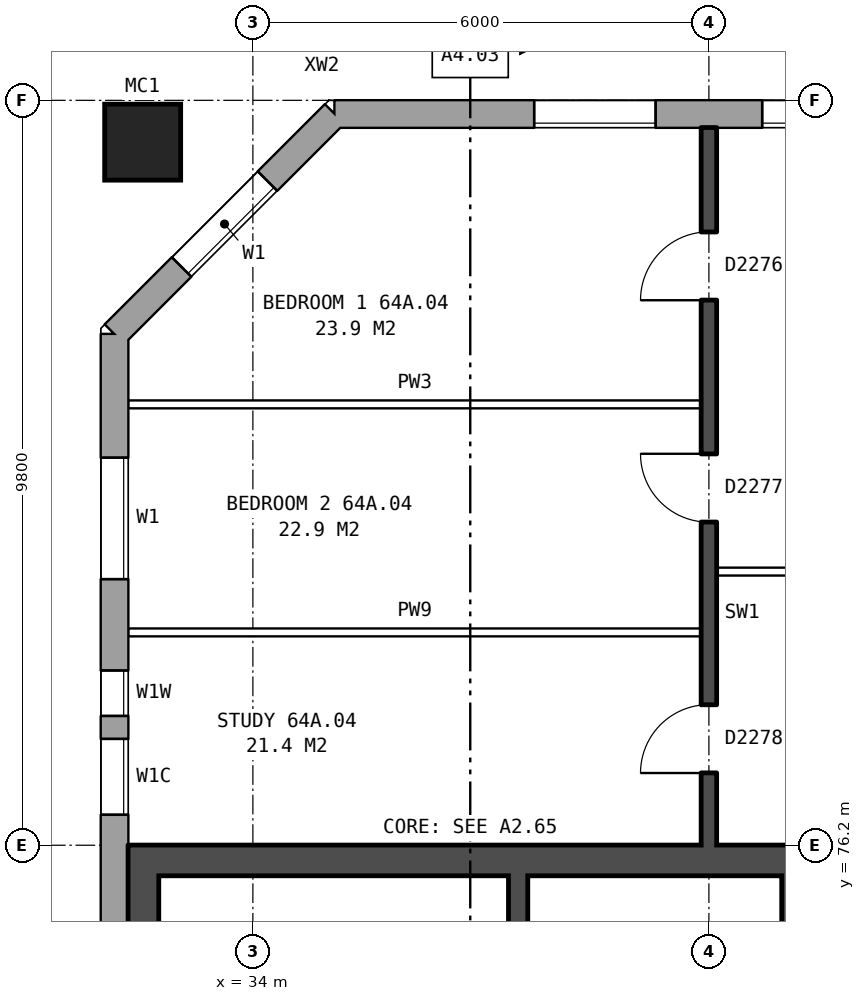
"""IFC4 building model, lengths in metres.
Left out: names, types, materials, properties, quantities, classifications, styles, units other than length and angle.
Written with IfcOpenShell. Run it as: python <this file> out.ifc"""

import sys

from ifc_helpers import new_model, si_unit, direction, frame, frame_2d, origin, origin_2d, place, context, subcontext, project, spatial, rectangle, hollow_rectangle, extrude, element, fill, save


model = new_model("IFC4")
c1 = context("Model", 3, precision=1e-05, world=origin(), true_north=direction((0.0, 1.0)))
c2 = subcontext(c1, "Body", "Model", "MODEL_VIEW")
j1 = project(units=[si_unit("LENGTHUNIT", "METRE"), si_unit("PLANEANGLEUNIT", "RADIAN")], contexts=[c1])
p1 = place(None, origin())
s1 = spatial("IfcSite", under=j1, at=p1, CompositionType="ELEMENT")
p2 = place(p1, origin())
s2 = spatial("IfcBuilding", under=s1, at=p2, CompositionType="ELEMENT")
p3 = place(p2, frame((0.0, 0.0, 227.6)))
s3 = spatial("IfcBuildingStorey", under=s2, at=p3, CompositionType="ELEMENT", Elevation=227.6)
p4 = place(p3, frame((32.55, 85.45, 0.0), z_axis=(0.0, 0.0, 1.0), x_axis=(1.0, 0.0, 0.0)))
e1 = element("IfcColumn", 1, at=p4, inside=s3, PredefinedType="COLUMN", context=c2, shape_type="SweptSolid", body=[
    extrude(hollow_rectangle(XDim=1.0, YDim=1.0, WallThickness=0.055, at=origin_2d()), origin(), (0.0, 0.0, 1.0), 3.1),
])
p5 = place(p3, frame((74.95, 85.82, 0.0), z_axis=(0.0, 0.0, 1.0), x_axis=(-1.0, 0.0, 0.0)))
e2 = element("IfcWall", 2, at=p5, inside=s3, PredefinedType="STANDARD", context=c2, shape_type="SweptSolid", body=[
    extrude(rectangle(XDim=39.875, YDim=0.36, at=frame_2d((19.938, 0.0))), origin(), (0.0, 0.0, 1.0), 2.85),
])
p6 = place(p5, frame((2.65, 0.0, 0.8)))
e3 = element("IfcOpeningElement", 3, at=p6, cuts=e2, PredefinedType="OPENING", context=c2, shape_type="SweptSolid", body=[
    extrude(rectangle(XDim=1.6, YDim=1.8, at=frame_2d((0.8, 0.9))), frame((0.0, 0.19, 0.0), z_axis=(0.0, -1.0, 0.0), x_axis=(1.0, 0.0, 0.0)), (0.0, 0.0, 1.0), 0.38),
])
p7 = place(p5, frame((5.65, 0.0, 0.8)))
e4 = element("IfcOpeningElement", 4, at=p7, cuts=e2, PredefinedType="OPENING", context=c2, shape_type="SweptSolid", body=[
    extrude(rectangle(XDim=1.6, YDim=1.8, at=frame_2d((0.8, 0.9))), frame((0.0, 0.19, 0.0), z_axis=(0.0, -1.0, 0.0), x_axis=(1.0, 0.0, 0.0)), (0.0, 0.0, 1.0), 0.38),
])
p8 = place(p5, frame((8.65, 0.0, 0.8)))
e5 = element("IfcOpeningElement", 5, at=p8, cuts=e2, PredefinedType="OPENING", context=c2, shape_type="SweptSolid", body=[
    extrude(rectangle(XDim=1.6, YDim=1.8, at=frame_2d((0.8, 0.9))), frame((0.0, 0.19, 0.0), z_axis=(0.0, -1.0, 0.0), x_axis=(1.0, 0.0, 0.0)), (0.0, 0.0, 1.0), 0.38),
])
p9 = place(p5, frame((11.65, 0.0, 0.8)))
e6 = element("IfcOpeningElement", 6, at=p9, cuts=e2, PredefinedType="OPENING", context=c2, shape_type="SweptSolid", body=[
    extrude(rectangle(XDim=1.6, YDim=1.8, at=frame_2d((0.8, 0.9))), frame((0.0, 0.19, 0.0), z_axis=(0.0, -1.0, 0.0), x_axis=(1.0, 0.0, 0.0)), (0.0, 0.0, 1.0), 0.38),
])
p10 = place(p5, frame((14.1, 0.0, 0.8)))
e7 = element("IfcOpeningElement", 7, at=p10, cuts=e2, PredefinedType="OPENING", context=c2, shape_type="SweptSolid", body=[
    extrude(rectangle(XDim=0.8, YDim=1.8, at=frame_2d((0.4, 0.9))), frame((0.0, 0.19, 0.0), z_axis=(0.0, -1.0, 0.0), x_axis=(1.0, 0.0, 0.0)), (0.0, 0.0, 1.0), 0.38),
])
p11 = place(p5, frame((17.65, 0.0, 0.8)))
e8 = element("IfcOpeningElement", 8, at=p11, cuts=e2, PredefinedType="OPENING", context=c2, shape_type="SweptSolid", body=[
    extrude(rectangle(XDim=1.6, YDim=1.8, at=frame_2d((0.8, 0.9))), frame((0.0, 0.19, 0.0), z_axis=(0.0, -1.0, 0.0), x_axis=(1.0, 0.0, 0.0)), (0.0, 0.0, 1.0), 0.38),
])
p12 = place(p5, frame((20.65, 0.0, 0.8)))
e9 = element("IfcOpeningElement", 9, at=p12, cuts=e2, PredefinedType="OPENING", context=c2, shape_type="SweptSolid", body=[
    extrude(rectangle(XDim=1.6, YDim=1.8, at=frame_2d((0.8, 0.9))), frame((0.0, 0.19, 0.0), z_axis=(0.0, -1.0, 0.0), x_axis=(1.0, 0.0, 0.0)), (0.0, 0.0, 1.0), 0.38),
])
p13 = place(p5, frame((23.15, 0.0, 0.75)))
e10 = element("IfcOpeningElement", 10, at=p13, cuts=e2, PredefinedType="OPENING", context=c2, shape_type="SweptSolid", body=[
    extrude(rectangle(XDim=1.2, YDim=1.8, at=frame_2d((0.6, 0.9))), frame((0.0, 0.19, 0.0), z_axis=(0.0, -1.0, 0.0), x_axis=(1.0, 0.0, 0.0)), (0.0, 0.0, 1.0), 0.38),
])
p14 = place(p5, frame((26.65, 0.0, 0.8)))
e11 = element("IfcOpeningElement", 11, at=p14, cuts=e2, PredefinedType="OPENING", context=c2, shape_type="SweptSolid", body=[
    extrude(rectangle(XDim=1.6, YDim=1.8, at=frame_2d((0.8, 0.9))), frame((0.0, 0.19, 0.0), z_axis=(0.0, -1.0, 0.0), x_axis=(1.0, 0.0, 0.0)), (0.0, 0.0, 1.0), 0.38),
])
p15 = place(p5, frame((29.65, 0.0, 0.8)))
e12 = element("IfcOpeningElement", 12, at=p15, cuts=e2, PredefinedType="OPENING", context=c2, shape_type="SweptSolid", body=[
    extrude(rectangle(XDim=1.6, YDim=1.8, at=frame_2d((0.8, 0.9))), frame((0.0, 0.19, 0.0), z_axis=(0.0, -1.0, 0.0), x_axis=(1.0, 0.0, 0.0)), (0.0, 0.0, 1.0), 0.38),
])
p16 = place(p5, frame((32.65, 0.0, 0.8)))
e13 = element("IfcOpeningElement", 13, at=p16, cuts=e2, PredefinedType="OPENING", context=c2, shape_type="SweptSolid", body=[
    extrude(rectangle(XDim=1.6, YDim=1.8, at=frame_2d((0.8, 0.9))), frame((0.0, 0.19, 0.0), z_axis=(0.0, -1.0, 0.0), x_axis=(1.0, 0.0, 0.0)), (0.0, 0.0, 1.0), 0.38),
])
p17 = place(p5, frame((35.65, 0.0, 0.8)))
e14 = element("IfcOpeningElement", 14, at=p17, cuts=e2, PredefinedType="OPENING", context=c2, shape_type="SweptSolid", body=[
    extrude(rectangle(XDim=1.6, YDim=1.8, at=frame_2d((0.8, 0.9))), frame((0.0, 0.19, 0.0), z_axis=(0.0, -1.0, 0.0), x_axis=(1.0, 0.0, 0.0)), (0.0, 0.0, 1.0), 0.38),
])
p18 = place(p5, frame((15.2, 0.0, 1.7)))
e15 = element("IfcOpeningElement", 15, at=p18, cuts=e2, PredefinedType="OPENING", context=c2, shape_type="SweptSolid", body=[
    extrude(rectangle(XDim=0.6, YDim=0.9, at=frame_2d((0.3, 0.45))), frame((0.0, 0.19, 0.0), z_axis=(0.0, -1.0, 0.0), x_axis=(1.0, 0.0, 0.0)), (0.0, 0.0, 1.0), 0.38),
])
p19 = place(p5, frame((24.65, 0.0, 0.35)))
e16 = element("IfcOpeningElement", 16, at=p19, cuts=e2, PredefinedType="OPENING", context=c2, shape_type="SweptSolid", body=[
    extrude(rectangle(XDim=0.6, YDim=0.9, at=frame_2d((0.3, 0.45))), frame((0.0, 0.19, 0.0), z_axis=(0.0, -1.0, 0.0), x_axis=(1.0, 0.0, 0.0)), (0.0, 0.0, 1.0), 0.38),
])
p20 = place(p3, frame((35.075, 85.82, 0.0), z_axis=(0.0, 0.0, 1.0), x_axis=(-0.707106781187, -0.707106781187, 0.0)))
e17 = element("IfcWall", 17, at=p20, inside=s3, PredefinedType="STANDARD", context=c2, shape_type="SweptSolid", body=[
    extrude(rectangle(XDim=4.094, YDim=0.36, at=frame_2d((2.047, 0.0))), origin(), (0.0, 0.0, 1.0), 2.85),
])
p21 = place(p20, frame((1.247, 0.0, 0.8)))
e18 = element("IfcOpeningElement", 18, at=p21, cuts=e17, PredefinedType="OPENING", context=c2, shape_type="SweptSolid", body=[
    extrude(rectangle(XDim=1.6, YDim=1.8, at=frame_2d((0.8, 0.9))), frame((0.0, 0.19, 0.0), z_axis=(0.0, -1.0, 0.0), x_axis=(1.0, 0.0, 0.0)), (0.0, 0.0, 1.0), 0.38),
])
p22 = place(p3, frame((32.18, 82.925, 0.0), z_axis=(0.0, 0.0, 1.0), x_axis=(0.0, -1.0, 0.0)))
e19 = element("IfcWall", 19, at=p22, inside=s3, PredefinedType="STANDARD", context=c2, shape_type="SweptSolid", body=[
    extrude(rectangle(XDim=25.851, YDim=0.36, at=frame_2d((12.925, 0.0))), origin(), (0.0, 0.0, 1.0), 2.85),
])
p23 = place(p22, frame((1.625, 0.0, 0.8)))
e20 = element("IfcOpeningElement", 20, at=p23, cuts=e19, PredefinedType="OPENING", context=c2, shape_type="SweptSolid", body=[
    extrude(rectangle(XDim=1.6, YDim=1.8, at=frame_2d((0.8, 0.9))), frame((0.0, 0.19, 0.0), z_axis=(0.0, -1.0, 0.0), x_axis=(1.0, 0.0, 0.0)), (0.0, 0.0, 1.0), 0.38),
])
p24 = place(p22, frame((4.425, 0.0, 1.7)))
e21 = element("IfcOpeningElement", 21, at=p24, cuts=e19, PredefinedType="OPENING", context=c2, shape_type="SweptSolid", body=[
    extrude(rectangle(XDim=0.6, YDim=0.9, at=frame_2d((0.3, 0.45))), frame((0.0, 0.19, 0.0), z_axis=(0.0, -1.0, 0.0), x_axis=(1.0, 0.0, 0.0)), (0.0, 0.0, 1.0), 0.38),
])
p25 = place(p22, frame((19.425, 0.0, 0.8)))
e22 = element("IfcOpeningElement", 22, at=p25, cuts=e19, PredefinedType="OPENING", context=c2, shape_type="SweptSolid", body=[
    extrude(rectangle(XDim=1.0, YDim=1.8, at=frame_2d((0.5, 0.9))), frame((0.0, 0.19, 0.0), z_axis=(0.0, -1.0, 0.0), x_axis=(1.0, 0.0, 0.0)), (0.0, 0.0, 1.0), 0.38),
])
p26 = place(p22, frame((22.625, 0.0, 0.8)))
e23 = element("IfcOpeningElement", 23, at=p26, cuts=e19, PredefinedType="OPENING", context=c2, shape_type="SweptSolid", body=[
    extrude(rectangle(XDim=1.6, YDim=1.8, at=frame_2d((0.8, 0.9))), frame((0.0, 0.19, 0.0), z_axis=(0.0, -1.0, 0.0), x_axis=(1.0, 0.0, 0.0)), (0.0, 0.0, 1.0), 0.38),
])
p27 = place(p22, frame((5.325, 0.0, 0.8)))
e24 = element("IfcOpeningElement", 24, at=p27, cuts=e19, PredefinedType="OPENING", context=c2, shape_type="SweptSolid", body=[
    extrude(rectangle(XDim=1.0, YDim=1.8, at=frame_2d((0.5, 0.9))), frame((0.0, 0.19, 0.0), z_axis=(0.0, -1.0, 0.0), x_axis=(1.0, 0.0, 0.0)), (0.0, 0.0, 1.0), 0.38),
])
p28 = place(p22, frame((20.725, 0.0, 1.6)))
e25 = element("IfcOpeningElement", 25, at=p28, cuts=e19, PredefinedType="OPENING", context=c2, shape_type="SweptSolid", body=[
    extrude(rectangle(XDim=0.6, YDim=0.9, at=frame_2d((0.3, 0.45))), frame((0.0, 0.19, 0.0), z_axis=(0.0, -1.0, 0.0), x_axis=(1.0, 0.0, 0.0)), (0.0, 0.0, 1.0), 0.38),
])
p29 = place(p3, frame((41.16, 76.2, 0.0), z_axis=(0.0, 0.0, 1.0), x_axis=(0.0, -1.0, 0.0)))
e26 = element("IfcWall", 26, at=p29, inside=s3, PredefinedType="SHEAR", context=c2, shape_type="SweptSolid", body=[
    extrude(rectangle(XDim=12.4, YDim=0.4, at=frame_2d((6.2, 0.0))), origin(), (0.0, 0.0, 1.0), 2.85),
])
p30 = place(p29, frame((1.325, 0.0, 0.0)))
e27 = element("IfcOpeningElement", 27, at=p30, cuts=e26, PredefinedType="OPENING", context=c2, shape_type="SweptSolid", body=[
    extrude(rectangle(XDim=1.1, YDim=2.1, at=frame_2d((0.55, 1.05))), frame((0.0, 0.21, 0.0), z_axis=(0.0, -1.0, 0.0), x_axis=(1.0, 0.0, 0.0)), (0.0, 0.0, 1.0), 0.42),
])
p31 = place(p29, frame((5.925, 0.0, 0.0)))
e28 = element("IfcOpeningElement", 28, at=p31, cuts=e26, PredefinedType="OPENING", context=c2, shape_type="SweptSolid", body=[
    extrude(rectangle(XDim=0.85, YDim=2.1, at=frame_2d((0.425, 1.05))), frame((0.0, 0.21, 0.0), z_axis=(0.0, -1.0, 0.0), x_axis=(1.0, 0.0, 0.0)), (0.0, 0.0, 1.0), 0.42),
])
p32 = place(p29, frame((9.9, 0.0, 0.0)))
e29 = element("IfcOpeningElement", 29, at=p32, cuts=e26, PredefinedType="OPENING", context=c2, shape_type="SweptSolid", body=[
    extrude(rectangle(XDim=1.1, YDim=2.1, at=frame_2d((0.55, 1.05))), frame((0.0, 0.21, 0.0), z_axis=(0.0, -1.0, 0.0), x_axis=(1.0, 0.0, 0.0)), (0.0, 0.0, 1.0), 0.42),
])
p33 = place(p3, frame((32.56, 76.2, 0.0), z_axis=(0.0, 0.0, 1.0), x_axis=(0.0, -1.0, 0.0)))
e30 = element("IfcWall", 30, at=p33, inside=s3, PredefinedType="SHEAR", context=c2, shape_type="SweptSolid", body=[
    extrude(rectangle(XDim=12.4, YDim=0.4, at=frame_2d((6.2, 0.0))), origin(), (0.0, 0.0, 1.0), 2.85),
])
p34 = place(p3, frame((40.96, 76.0, 0.0), z_axis=(0.0, 0.0, 1.0), x_axis=(-1.0, 0.0, 0.0)))
e31 = element("IfcWall", 31, at=p34, inside=s3, PredefinedType="SHEAR", context=c2, shape_type="SweptSolid", body=[
    extrude(rectangle(XDim=8.2, YDim=0.4, at=frame_2d((4.1, 0.0))), origin(), (0.0, 0.0, 1.0), 2.85),
])
p35 = place(p3, frame((37.49, 75.8, 0.0), z_axis=(0.0, 0.0, 1.0), x_axis=(0.0, -1.0, 0.0)))
e32 = element("IfcWall", 32, at=p35, inside=s3, PredefinedType="SHEAR", context=c2, shape_type="SweptSolid", body=[
    extrude(rectangle(XDim=2.525, YDim=0.25, at=frame_2d((1.263, 0.0))), origin(), (0.0, 0.0, 1.0), 2.85),
])
p36 = place(p3, frame((32.36, 79.0, 0.0), z_axis=(0.0, 0.0, 1.0), x_axis=(1.0, 0.0, 0.0)))
e33 = element("IfcWall", 33, at=p36, inside=s3, PredefinedType="PARTITIONING", context=c2, shape_type="SweptSolid", body=[
    extrude(rectangle(XDim=7.54, YDim=0.1, at=frame_2d((3.77, 0.0))), origin(), (0.0, 0.0, 1.0), 2.85),
])
p37 = place(p3, frame((40.1, 79.8, 0.0), z_axis=(0.0, 0.0, 1.0), x_axis=(1.0, 0.0, 0.0)))
e34 = element("IfcWall", 34, at=p37, inside=s3, PredefinedType="PARTITIONING", context=c2, shape_type="SweptSolid", body=[
    extrude(rectangle(XDim=5.8, YDim=0.1, at=frame_2d((2.9, 0.0))), origin(), (0.0, 0.0, 1.0), 2.85),
])
p38 = place(p37, frame((1.3, 0.0, 0.0)))
e35 = element("IfcOpeningElement", 35, at=p38, cuts=e34, PredefinedType="OPENING", context=c2, shape_type="SweptSolid", body=[
    extrude(rectangle(XDim=0.9, YDim=2.1, at=frame_2d((0.45, 1.05))), frame((0.0, 0.06, 0.0), z_axis=(0.0, -1.0, 0.0), x_axis=(1.0, 0.0, 0.0)), (0.0, 0.0, 1.0), 0.12),
])
p39 = place(p37, frame((4.2, 0.0, 0.0)))
e36 = element("IfcOpeningElement", 36, at=p39, cuts=e34, PredefinedType="OPENING", context=c2, shape_type="SweptSolid", body=[
    extrude(rectangle(XDim=0.9, YDim=2.1, at=frame_2d((0.45, 1.05))), frame((0.0, 0.06, 0.0), z_axis=(0.0, -1.0, 0.0), x_axis=(1.0, 0.0, 0.0)), (0.0, 0.0, 1.0), 0.12),
])
p40 = place(p3, frame((32.36, 82.0, 0.0), z_axis=(0.0, 0.0, 1.0), x_axis=(1.0, 0.0, 0.0)))
e37 = element("IfcWall", 37, at=p40, inside=s3, PredefinedType="PARTITIONING", context=c2, shape_type="SweptSolid", body=[
    extrude(rectangle(XDim=7.54, YDim=0.1, at=frame_2d((3.77, 0.0))), origin(), (0.0, 0.0, 1.0), 2.85),
])
p41 = place(p3, frame((40.0, 76.2, 0.0), z_axis=(0.0, 0.0, 1.0), x_axis=(0.0, 1.0, 0.0)))
e38 = element("IfcWall", 38, at=p41, inside=s3, PredefinedType="SOLIDWALL", context=c2, shape_type="SweptSolid", body=[
    extrude(rectangle(XDim=9.44, YDim=0.2, at=frame_2d((4.72, 0.0))), origin(), (0.0, 0.0, 1.0), 2.85),
])
p42 = place(p41, frame((7.17, 0.0, 0.0)))
e39 = element("IfcOpeningElement", 39, at=p42, cuts=e38, PredefinedType="OPENING", context=c2, shape_type="SweptSolid", body=[
    extrude(rectangle(XDim=0.9, YDim=2.1, at=frame_2d((0.45, 1.05))), frame((0.0, 0.11, 0.0), z_axis=(0.0, -1.0, 0.0), x_axis=(1.0, 0.0, 0.0)), (0.0, 0.0, 1.0), 0.22),
])
p43 = place(p41, frame((4.25, 0.0, 0.0)))
e40 = element("IfcOpeningElement", 40, at=p43, cuts=e38, PredefinedType="OPENING", context=c2, shape_type="SweptSolid", body=[
    extrude(rectangle(XDim=0.9, YDim=2.1, at=frame_2d((0.45, 1.05))), frame((0.0, 0.11, 0.0), z_axis=(0.0, -1.0, 0.0), x_axis=(1.0, 0.0, 0.0)), (0.0, 0.0, 1.0), 0.22),
])
p44 = place(p41, frame((0.95, 0.0, 0.0)))
e41 = element("IfcOpeningElement", 41, at=p44, cuts=e38, PredefinedType="OPENING", context=c2, shape_type="SweptSolid", body=[
    extrude(rectangle(XDim=0.9, YDim=2.1, at=frame_2d((0.45, 1.05))), frame((0.0, 0.11, 0.0), z_axis=(0.0, -1.0, 0.0), x_axis=(1.0, 0.0, 0.0)), (0.0, 0.0, 1.0), 0.22),
])
p45 = place(p16, origin())
e42 = element("IfcWindow", 42, at=p45, inside=s3, PartitioningType="SINGLE_PANEL", PredefinedType="WINDOW", context=c2, shape_type="SweptSolid", body=[
    extrude(rectangle(XDim=1.6, YDim=1.8, at=frame_2d((0.8, 0.9))), frame((0.0, 0.15, 0.0), z_axis=(0.0, -1.0, 0.0), x_axis=(1.0, 0.0, 0.0)), (0.0, 0.0, 1.0), 0.06),
])
fill(e13, e42)
p46 = place(p17, origin())
e43 = element("IfcWindow", 43, at=p46, inside=s3, PartitioningType="SINGLE_PANEL", PredefinedType="WINDOW", context=c2, shape_type="SweptSolid", body=[
    extrude(rectangle(XDim=1.6, YDim=1.8, at=frame_2d((0.8, 0.9))), frame((0.0, 0.15, 0.0), z_axis=(0.0, -1.0, 0.0), x_axis=(1.0, 0.0, 0.0)), (0.0, 0.0, 1.0), 0.06),
])
fill(e14, e43)
p47 = place(p21, origin())
e44 = element("IfcWindow", 44, at=p47, inside=s3, PartitioningType="SINGLE_PANEL", PredefinedType="WINDOW", context=c2, shape_type="SweptSolid", body=[
    extrude(rectangle(XDim=1.6, YDim=1.8, at=frame_2d((0.8, 0.9))), frame((0.0, 0.15, 0.0), z_axis=(0.0, -1.0, 0.0), x_axis=(1.0, 0.0, 0.0)), (0.0, 0.0, 1.0), 0.06),
])
fill(e18, e44)
p48 = place(p23, origin())
e45 = element("IfcWindow", 45, at=p48, inside=s3, PartitioningType="SINGLE_PANEL", PredefinedType="WINDOW", context=c2, shape_type="SweptSolid", body=[
    extrude(rectangle(XDim=1.6, YDim=1.8, at=frame_2d((0.8, 0.9))), frame((0.0, 0.15, 0.0), z_axis=(0.0, -1.0, 0.0), x_axis=(1.0, 0.0, 0.0)), (0.0, 0.0, 1.0), 0.06),
])
fill(e20, e45)
p49 = place(p24, origin())
e46 = element("IfcWindow", 46, at=p49, inside=s3, PartitioningType="SINGLE_PANEL", PredefinedType="WINDOW", context=c2, shape_type="SweptSolid", body=[
    extrude(rectangle(XDim=0.6, YDim=0.9, at=frame_2d((0.3, 0.45))), frame((0.0, 0.15, 0.0), z_axis=(0.0, -1.0, 0.0), x_axis=(1.0, 0.0, 0.0)), (0.0, 0.0, 1.0), 0.06),
])
fill(e21, e46)
p50 = place(p42, origin())
e47 = element("IfcDoor", 47, at=p50, inside=s3, OperationType="SINGLE_SWING_LEFT", PredefinedType="DOOR", context=c2, shape_type="SweptSolid", body=[
    extrude(rectangle(XDim=0.9, YDim=2.1, at=frame_2d((0.45, 1.05))), frame((0.0, 0.025, 0.0), z_axis=(0.0, -1.0, 0.0), x_axis=(1.0, 0.0, 0.0)), (0.0, 0.0, 1.0), 0.05),
])
fill(e39, e47)
p51 = place(p43, origin())
e48 = element("IfcDoor", 48, at=p51, inside=s3, OperationType="SINGLE_SWING_RIGHT", PredefinedType="DOOR", context=c2, shape_type="SweptSolid", body=[
    extrude(rectangle(XDim=0.9, YDim=2.1, at=frame_2d((0.45, 1.05))), frame((0.0, 0.025, 0.0), z_axis=(0.0, -1.0, 0.0), x_axis=(1.0, 0.0, 0.0)), (0.0, 0.0, 1.0), 0.05),
])
fill(e40, e48)
p52 = place(p44, origin())
e49 = element("IfcDoor", 49, at=p52, inside=s3, OperationType="SINGLE_SWING_LEFT", PredefinedType="DOOR", context=c2, shape_type="SweptSolid", body=[
    extrude(rectangle(XDim=0.9, YDim=2.1, at=frame_2d((0.45, 1.05))), frame((0.0, 0.025, 0.0), z_axis=(0.0, -1.0, 0.0), x_axis=(1.0, 0.0, 0.0)), (0.0, 0.0, 1.0), 0.05),
])
fill(e41, e49)
p53 = place(p27, origin())
e50 = element("IfcWindow", 50, at=p53, inside=s3, PartitioningType="SINGLE_PANEL", PredefinedType="WINDOW", context=c2, shape_type="SweptSolid", body=[
    extrude(rectangle(XDim=1.0, YDim=1.8, at=frame_2d((0.5, 0.9))), frame((0.0, 0.15, 0.0), z_axis=(0.0, -1.0, 0.0), x_axis=(1.0, 0.0, 0.0)), (0.0, 0.0, 1.0), 0.06),
])
fill(e24, e50)
save(model, sys.argv[1])
